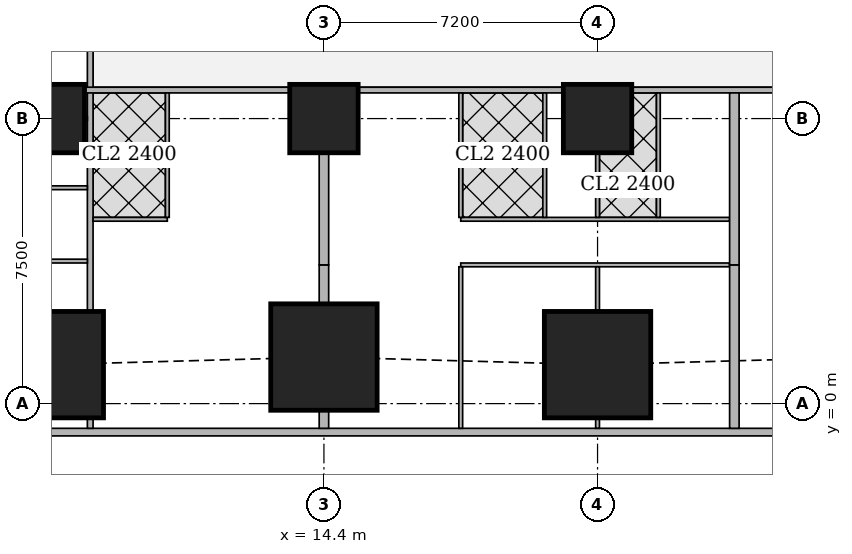
"""IFC4 building model, lengths in metres.
Left out: names, types, materials, properties, quantities, classifications, styles, units other than length and angle.
Written with IfcOpenShell. Run it as: python <this file> out.ifc"""

import sys

from ifc_helpers import new_model, si_unit, direction, frame, frame_2d, origin, origin_2d, place, context, subcontext, project, spatial, rectangle, extrude, element, fill, save


model = new_model("IFC4")
c1 = context("Model", 3, precision=1e-05, world=origin(), true_north=direction((0.0, 1.0)))
c2 = subcontext(c1, "Body", "Model", "MODEL_VIEW")
j1 = project(units=[si_unit("LENGTHUNIT", "METRE"), si_unit("PLANEANGLEUNIT", "RADIAN")], contexts=[c1])
p1 = place(None, origin())
s1 = spatial("IfcSite", under=j1, at=p1, CompositionType="ELEMENT")
p2 = place(p1, origin())
s2 = spatial("IfcBuilding", under=s1, at=p2, CompositionType="ELEMENT")
p3 = place(p2, frame((0.0, 0.0, 31.25)))
s3 = spatial("IfcBuildingStorey", under=s2, at=p3, CompositionType="ELEMENT", Elevation=31.25)
for number, where, z_axis, x_axis in (
    (1, (7.2, 1.025, 0.0), (0.0, 0.0, 1.0), (1.0, 0.0, 0.0)),
    (2, (14.4, 1.225, 0.0), (0.0, 0.0, 1.0), (1.0, 0.0, 0.0)),
    (3, (21.6, 1.025, 0.0), (0.0, 0.0, 1.0), (1.0, 0.0, 0.0)),
):
    element("IfcColumn", number, at=place(p3, frame(where, z_axis=z_axis, x_axis=x_axis)), inside=s3, PredefinedType="COLUMN", context=c2, shape_type="SweptSolid", body=[
        extrude(rectangle(XDim=2.8, YDim=2.8, at=origin_2d()), origin(), (0.0, 0.0, 1.0), 3.75),
    ])
for number, where, z_axis, x_axis in (
    (4, (7.2, 7.5, 0.0), (0.0, 0.0, 1.0), (1.0, 0.0, 0.0)),
    (5, (14.4, 7.5, 0.0), (0.0, 0.0, 1.0), (1.0, 0.0, 0.0)),
    (6, (21.6, 7.5, 0.0), (0.0, 0.0, 1.0), (1.0, 0.0, 0.0)),
):
    element("IfcColumn", number, at=place(p3, frame(where, z_axis=z_axis, x_axis=x_axis)), inside=s3, PredefinedType="COLUMN", context=c2, shape_type="SweptSolid", body=[
        extrude(rectangle(XDim=1.8, YDim=1.8, at=origin_2d()), origin(), (0.0, 0.0, 1.0), 3.75),
    ])
p4 = place(p3, frame((2.163, -0.75, 0.0), z_axis=(0.0, 0.0, 1.0), x_axis=(1.0, 0.0, 0.0)))
e7 = element("IfcWall", 7, at=p4, inside=s3, PredefinedType="SOLIDWALL", context=c2, shape_type="SweptSolid", body=[
    extrude(rectangle(XDim=45.628, YDim=0.2, at=frame_2d((22.814, 0.0))), origin(), (0.0, 0.0, 1.0), 3.5),
])
p5 = place(p4, frame((9.537, 0.0, 0.9)))
e8 = element("IfcOpeningElement", 8, at=p5, cuts=e7, PredefinedType="OPENING", context=c2, shape_type="SweptSolid", body=[
    extrude(rectangle(XDim=1.8, YDim=1.5, at=frame_2d((0.9, 0.75))), frame((0.0, 0.11, 0.0), z_axis=(0.0, -1.0, 0.0), x_axis=(1.0, 0.0, 0.0)), (0.0, 0.0, 1.0), 0.22),
])
p6 = place(p4, frame((13.137, 0.0, 0.9)))
e9 = element("IfcOpeningElement", 9, at=p6, cuts=e7, PredefinedType="OPENING", context=c2, shape_type="SweptSolid", body=[
    extrude(rectangle(XDim=1.8, YDim=1.5, at=frame_2d((0.9, 0.75))), frame((0.0, 0.11, 0.0), z_axis=(0.0, -1.0, 0.0), x_axis=(1.0, 0.0, 0.0)), (0.0, 0.0, 1.0), 0.22),
])
p7 = place(p4, frame((16.737, 0.0, 0.9)))
e10 = element("IfcOpeningElement", 10, at=p7, cuts=e7, PredefinedType="OPENING", context=c2, shape_type="SweptSolid", body=[
    extrude(rectangle(XDim=1.8, YDim=1.5, at=frame_2d((0.9, 0.75))), frame((0.0, 0.11, 0.0), z_axis=(0.0, -1.0, 0.0), x_axis=(1.0, 0.0, 0.0)), (0.0, 0.0, 1.0), 0.22),
])
p8 = place(p4, frame((20.337, 0.0, 0.9)))
e11 = element("IfcOpeningElement", 11, at=p8, cuts=e7, PredefinedType="OPENING", context=c2, shape_type="SweptSolid", body=[
    extrude(rectangle(XDim=1.8, YDim=1.5, at=frame_2d((0.9, 0.75))), frame((0.0, 0.11, 0.0), z_axis=(0.0, -1.0, 0.0), x_axis=(1.0, 0.0, 0.0)), (0.0, 0.0, 1.0), 0.22),
])
p9 = place(p4, frame((23.937, 0.0, 0.9)))
e12 = element("IfcOpeningElement", 12, at=p9, cuts=e7, PredefinedType="OPENING", context=c2, shape_type="SweptSolid", body=[
    extrude(rectangle(XDim=1.8, YDim=1.5, at=frame_2d((0.9, 0.75))), frame((0.0, 0.11, 0.0), z_axis=(0.0, -1.0, 0.0), x_axis=(1.0, 0.0, 0.0)), (0.0, 0.0, 1.0), 0.22),
])
p10 = place(p4, frame((27.537, 0.0, 0.9)))
e13 = element("IfcOpeningElement", 13, at=p10, cuts=e7, PredefinedType="OPENING", context=c2, shape_type="SweptSolid", body=[
    extrude(rectangle(XDim=1.8, YDim=1.5, at=frame_2d((0.9, 0.75))), frame((0.0, 0.11, 0.0), z_axis=(0.0, -1.0, 0.0), x_axis=(1.0, 0.0, 0.0)), (0.0, 0.0, 1.0), 0.22),
])
p11 = place(p4, frame((31.137, 0.0, 0.9)))
e14 = element("IfcOpeningElement", 14, at=p11, cuts=e7, PredefinedType="OPENING", context=c2, shape_type="SweptSolid", body=[
    extrude(rectangle(XDim=1.8, YDim=1.5, at=frame_2d((0.9, 0.75))), frame((0.0, 0.11, 0.0), z_axis=(0.0, -1.0, 0.0), x_axis=(1.0, 0.0, 0.0)), (0.0, 0.0, 1.0), 0.22),
])
p12 = place(p4, frame((34.737, 0.0, 0.9)))
e15 = element("IfcOpeningElement", 15, at=p12, cuts=e7, PredefinedType="OPENING", context=c2, shape_type="SweptSolid", body=[
    extrude(rectangle(XDim=1.8, YDim=1.5, at=frame_2d((0.9, 0.75))), frame((0.0, 0.11, 0.0), z_axis=(0.0, -1.0, 0.0), x_axis=(1.0, 0.0, 0.0)), (0.0, 0.0, 1.0), 0.22),
])
p13 = place(p3, frame((8.25, -0.65, 0.0), z_axis=(0.0, 0.0, 1.0), x_axis=(0.0, 1.0, 0.0)))
e16 = element("IfcWall", 16, at=p13, inside=s3, PredefinedType="SOLIDWALL", context=c2, shape_type="SweptSolid", body=[
    extrude(rectangle(XDim=0.274, YDim=0.15, at=frame_2d((0.137, 0.0))), origin(), (0.0, 0.0, 1.0), 3.5),
])
p14 = place(p3, frame((8.25, 2.426, 0.0), z_axis=(0.0, 0.0, 1.0), x_axis=(0.0, 1.0, 0.0)))
e17 = element("IfcWall", 17, at=p14, inside=s3, PredefinedType="SOLIDWALL", context=c2, shape_type="SweptSolid", body=[
    extrude(rectangle(XDim=40.173, YDim=0.15, at=frame_2d((20.086, 0.0))), origin(), (0.0, 0.0, 1.0), 3.5),
])
p15 = place(p14, frame((14.161, 0.0, 0.0)))
e18 = element("IfcOpeningElement", 18, at=p15, cuts=e17, PredefinedType="OPENING", context=c2, shape_type="SweptSolid", body=[
    extrude(rectangle(XDim=1.0, YDim=2.1, at=frame_2d((0.5, 1.05))), frame((0.0, 0.085, 0.0), z_axis=(0.0, -1.0, 0.0), x_axis=(1.0, 0.0, 0.0)), (0.0, 0.0, 1.0), 0.17),
])
p16 = place(p14, frame((17.487, 0.0, 0.0)))
e19 = element("IfcOpeningElement", 19, at=p16, cuts=e17, PredefinedType="OPENING", context=c2, shape_type="SweptSolid", body=[
    extrude(rectangle(XDim=1.0, YDim=2.1, at=frame_2d((0.5, 1.05))), frame((0.0, 0.085, 0.0), z_axis=(0.0, -1.0, 0.0), x_axis=(1.0, 0.0, 0.0)), (0.0, 0.0, 1.0), 0.17),
])
p17 = place(p14, frame((29.161, 0.0, 0.0)))
e20 = element("IfcOpeningElement", 20, at=p17, cuts=e17, PredefinedType="OPENING", context=c2, shape_type="SweptSolid", body=[
    extrude(rectangle(XDim=1.0, YDim=2.1, at=frame_2d((0.5, 1.05))), frame((0.0, 0.085, 0.0), z_axis=(0.0, -1.0, 0.0), x_axis=(1.0, 0.0, 0.0)), (0.0, 0.0, 1.0), 0.17),
])
p18 = place(p3, frame((27.899, 8.25, 0.0), z_axis=(0.0, 0.0, 1.0), x_axis=(-1.0, 0.0, 0.0)))
e21 = element("IfcWall", 21, at=p18, inside=s3, PredefinedType="SOLIDWALL", context=c2, shape_type="SweptSolid", body=[
    extrude(rectangle(XDim=5.398, YDim=0.15, at=frame_2d((2.699, 0.0))), origin(), (0.0, 0.0, 1.0), 3.5),
])
p19 = place(p18, frame((0.799, 0.0, 0.0)))
e22 = element("IfcOpeningElement", 22, at=p19, cuts=e21, PredefinedType="OPENING", context=c2, shape_type="SweptSolid", body=[
    extrude(rectangle(XDim=1.0, YDim=2.1, at=frame_2d((0.5, 1.05))), frame((0.0, 0.085, 0.0), z_axis=(0.0, -1.0, 0.0), x_axis=(1.0, 0.0, 0.0)), (0.0, 0.0, 1.0), 0.17),
])
p20 = place(p3, frame((20.699, 8.25, 0.0), z_axis=(0.0, 0.0, 1.0), x_axis=(-1.0, 0.0, 0.0)))
e23 = element("IfcWall", 23, at=p20, inside=s3, PredefinedType="SOLIDWALL", context=c2, shape_type="SweptSolid", body=[
    extrude(rectangle(XDim=5.398, YDim=0.15, at=frame_2d((2.699, 0.0))), origin(), (0.0, 0.0, 1.0), 3.5),
])
p21 = place(p20, frame((3.599, 0.0, 0.0)))
e24 = element("IfcOpeningElement", 24, at=p21, cuts=e23, PredefinedType="OPENING", context=c2, shape_type="SweptSolid", body=[
    extrude(rectangle(XDim=1.0, YDim=2.1, at=frame_2d((0.5, 1.05))), frame((0.0, 0.085, 0.0), z_axis=(0.0, -1.0, 0.0), x_axis=(1.0, 0.0, 0.0)), (0.0, 0.0, 1.0), 0.17),
])
p22 = place(p3, frame((13.499, 8.25, 0.0), z_axis=(0.0, 0.0, 1.0), x_axis=(-1.0, 0.0, 0.0)))
e25 = element("IfcWall", 25, at=p22, inside=s3, PredefinedType="SOLIDWALL", context=c2, shape_type="SweptSolid", body=[
    extrude(rectangle(XDim=5.399, YDim=0.15, at=frame_2d((2.699, 0.0))), origin(), (0.0, 0.0, 1.0), 3.5),
])
p23 = place(p22, frame((0.66, 0.0, 0.0)))
e26 = element("IfcOpeningElement", 26, at=p23, cuts=e25, PredefinedType="OPENING", context=c2, shape_type="SweptSolid", body=[
    extrude(rectangle(XDim=1.0, YDim=2.1, at=frame_2d((0.5, 1.05))), frame((0.0, 0.085, 0.0), z_axis=(0.0, -1.0, 0.0), x_axis=(1.0, 0.0, 0.0)), (0.0, 0.0, 1.0), 0.17),
])
p24 = place(p3, frame((4.9, 3.75, 0.0), z_axis=(0.0, 0.0, 1.0), x_axis=(1.0, 0.0, 0.0)))
e27 = element("IfcWall", 27, at=p24, inside=s3, PredefinedType="PARTITIONING", context=c2, shape_type="SweptSolid", body=[
    extrude(rectangle(XDim=3.275, YDim=0.1, at=frame_2d((1.638, 0.0))), origin(), (0.0, 0.0, 1.0), 3.5),
])
p25 = place(p3, frame((8.101, 7.5, 0.0), z_axis=(0.0, 0.0, 1.0), x_axis=(1.0, 0.0, 0.0)))
e28 = element("IfcWall", 28, at=p25, inside=s3, PredefinedType="PARTITIONING", context=c2, shape_type="SweptSolid", body=[
    extrude(rectangle(XDim=0.074, YDim=0.1, at=frame_2d((0.037, 0.0))), origin(), (0.0, 0.0, 1.0), 3.5),
])
p26 = place(p3, frame((4.9, 5.68, 0.0), z_axis=(0.0, 0.0, 1.0), x_axis=(1.0, 0.0, 0.0)))
e29 = element("IfcWall", 29, at=p26, inside=s3, PredefinedType="PARTITIONING", context=c2, shape_type="SweptSolid", body=[
    extrude(rectangle(XDim=3.275, YDim=0.1, at=frame_2d((1.638, 0.0))), origin(), (0.0, 0.0, 1.0), 3.5),
])
p27 = place(p3, frame((10.279, 4.85, 0.0), z_axis=(0.0, 0.0, 1.0), x_axis=(-1.0, 0.0, 0.0)))
e30 = element("IfcWall", 30, at=p27, inside=s3, PredefinedType="PARTITIONING", context=c2, shape_type="SweptSolid", body=[
    extrude(rectangle(XDim=1.954, YDim=0.1, at=frame_2d((0.977, 0.0))), origin(), (0.0, 0.0, 1.0), 3.5),
])
p28 = place(p27, frame((0.579, 0.0, 0.0)))
e31 = element("IfcOpeningElement", 31, at=p28, cuts=e30, PredefinedType="OPENING", context=c2, shape_type="SweptSolid", body=[
    extrude(rectangle(XDim=0.9, YDim=2.1, at=frame_2d((0.45, 1.05))), frame((0.0, 0.06, 0.0), z_axis=(0.0, -1.0, 0.0), x_axis=(1.0, 0.0, 0.0)), (0.0, 0.0, 1.0), 0.12),
])
p29 = place(p3, frame((10.279, 4.9, 0.0), z_axis=(0.0, 0.0, 1.0), x_axis=(0.0, 1.0, 0.0)))
e32 = element("IfcWall", 32, at=p29, inside=s3, PredefinedType="PARTITIONING", context=c2, shape_type="SweptSolid", body=[
    extrude(rectangle(XDim=3.275, YDim=0.1, at=frame_2d((1.638, 0.0))), origin(), (0.0, 0.0, 1.0), 3.5),
])
p30 = place(p3, frame((25.075, 3.65, 0.0), z_axis=(0.0, 0.0, 1.0), x_axis=(-1.0, 0.0, 0.0)))
e33 = element("IfcWall", 33, at=p30, inside=s3, PredefinedType="PARTITIONING", context=c2, shape_type="SweptSolid", body=[
    extrude(rectangle(XDim=7.075, YDim=0.1, at=frame_2d((3.538, 0.0))), origin(), (0.0, 0.0, 1.0), 3.5),
])
p31 = place(p30, frame((5.975, 0.0, 0.0)))
e34 = element("IfcOpeningElement", 34, at=p31, cuts=e33, PredefinedType="OPENING", context=c2, shape_type="SweptSolid", body=[
    extrude(rectangle(XDim=0.9, YDim=2.1, at=frame_2d((0.45, 1.05))), frame((0.0, 0.06, 0.0), z_axis=(0.0, -1.0, 0.0), x_axis=(1.0, 0.0, 0.0)), (0.0, 0.0, 1.0), 0.12),
])
p32 = place(p30, frame((1.15, 0.0, 0.0)))
e35 = element("IfcOpeningElement", 35, at=p32, cuts=e33, PredefinedType="OPENING", context=c2, shape_type="SweptSolid", body=[
    extrude(rectangle(XDim=0.9, YDim=2.1, at=frame_2d((0.45, 1.05))), frame((0.0, 0.06, 0.0), z_axis=(0.0, -1.0, 0.0), x_axis=(1.0, 0.0, 0.0)), (0.0, 0.0, 1.0), 0.12),
])
p33 = place(p3, frame((25.075, 4.85, 0.0), z_axis=(0.0, 0.0, 1.0), x_axis=(-1.0, 0.0, 0.0)))
e36 = element("IfcWall", 36, at=p33, inside=s3, PredefinedType="PARTITIONING", context=c2, shape_type="SweptSolid", body=[
    extrude(rectangle(XDim=7.075, YDim=0.1, at=frame_2d((3.538, 0.0))), origin(), (0.0, 0.0, 1.0), 3.5),
])
p34 = place(p33, frame((5.52, 0.0, 0.0)))
e37 = element("IfcOpeningElement", 37, at=p34, cuts=e36, PredefinedType="OPENING", context=c2, shape_type="SweptSolid", body=[
    extrude(rectangle(XDim=0.9, YDim=2.1, at=frame_2d((0.45, 1.05))), frame((0.0, 0.06, 0.0), z_axis=(0.0, -1.0, 0.0), x_axis=(1.0, 0.0, 0.0)), (0.0, 0.0, 1.0), 0.12),
])
p35 = place(p33, frame((2.225, 0.0, 0.0)))
e38 = element("IfcOpeningElement", 38, at=p35, cuts=e36, PredefinedType="OPENING", context=c2, shape_type="SweptSolid", body=[
    extrude(rectangle(XDim=0.9, YDim=2.1, at=frame_2d((0.45, 1.05))), frame((0.0, 0.06, 0.0), z_axis=(0.0, -1.0, 0.0), x_axis=(1.0, 0.0, 0.0)), (0.0, 0.0, 1.0), 0.12),
])
p36 = place(p33, frame((3.72, 0.0, 0.0)))
e39 = element("IfcOpeningElement", 39, at=p36, cuts=e36, PredefinedType="OPENING", context=c2, shape_type="SweptSolid", body=[
    extrude(rectangle(XDim=0.9, YDim=2.1, at=frame_2d((0.45, 1.05))), frame((0.0, 0.06, 0.0), z_axis=(0.0, -1.0, 0.0), x_axis=(1.0, 0.0, 0.0)), (0.0, 0.0, 1.0), 0.12),
])
p37 = place(p33, frame((0.425, 0.0, 0.0)))
e40 = element("IfcOpeningElement", 40, at=p37, cuts=e36, PredefinedType="OPENING", context=c2, shape_type="SweptSolid", body=[
    extrude(rectangle(XDim=0.9, YDim=2.1, at=frame_2d((0.45, 1.05))), frame((0.0, 0.06, 0.0), z_axis=(0.0, -1.0, 0.0), x_axis=(1.0, 0.0, 0.0)), (0.0, 0.0, 1.0), 0.12),
])
p38 = place(p3, frame((18.0, -0.65, 0.0), z_axis=(0.0, 0.0, 1.0), x_axis=(0.0, 1.0, 0.0)))
e41 = element("IfcWall", 41, at=p38, inside=s3, PredefinedType="PARTITIONING", context=c2, shape_type="SweptSolid", body=[
    extrude(rectangle(XDim=4.25, YDim=0.1, at=frame_2d((2.125, 0.0))), origin(), (0.0, 0.0, 1.0), 2.05),
])
p39 = place(p3, frame((21.6, -0.65, 0.0), z_axis=(0.0, 0.0, 1.0), x_axis=(0.0, 1.0, 0.0)))
e42 = element("IfcWall", 42, at=p39, inside=s3, PredefinedType="PARTITIONING", context=c2, shape_type="SweptSolid", body=[
    extrude(rectangle(XDim=0.274, YDim=0.1, at=frame_2d((0.137, 0.0))), origin(), (0.0, 0.0, 1.0), 3.5),
])
p40 = place(p3, frame((21.6, 2.426, 0.0), z_axis=(0.0, 0.0, 1.0), x_axis=(0.0, 1.0, 0.0)))
e43 = element("IfcWall", 43, at=p40, inside=s3, PredefinedType="PARTITIONING", context=c2, shape_type="SweptSolid", body=[
    extrude(rectangle(XDim=1.174, YDim=0.1, at=frame_2d((0.587, 0.0))), origin(), (0.0, 0.0, 1.0), 3.5),
])
p41 = place(p3, frame((18.0, 4.9, 0.0), z_axis=(0.0, 0.0, 1.0), x_axis=(0.0, 1.0, 0.0)))
e44 = element("IfcWall", 44, at=p41, inside=s3, PredefinedType="PARTITIONING", context=c2, shape_type="SweptSolid", body=[
    extrude(rectangle(XDim=3.275, YDim=0.1, at=frame_2d((1.638, 0.0))), origin(), (0.0, 0.0, 1.0), 3.5),
])
p42 = place(p3, frame((21.6, 4.9, 0.0), z_axis=(0.0, 0.0, 1.0), x_axis=(0.0, 1.0, 0.0)))
e45 = element("IfcWall", 45, at=p42, inside=s3, PredefinedType="PARTITIONING", context=c2, shape_type="SweptSolid", body=[
    extrude(rectangle(XDim=1.699, YDim=0.1, at=frame_2d((0.85, 0.0))), origin(), (0.0, 0.0, 1.0), 3.5),
])
for number, where, z_axis, x_axis in (
    (46, (20.21, 4.9, 0.0), (0.0, 0.0, 1.0), (0.0, 1.0, 0.0)),
    (47, (23.2, 4.9, 0.0), (0.0, 0.0, 1.0), (0.0, 1.0, 0.0)),
):
    element("IfcWall", number, at=place(p3, frame(where, z_axis=z_axis, x_axis=x_axis)), inside=s3, PredefinedType="PARTITIONING", context=c2, shape_type="SweptSolid", body=[
        extrude(rectangle(XDim=3.275, YDim=0.1, at=frame_2d((1.638, 0.0))), origin(), (0.0, 0.0, 1.0), 3.5),
    ])
p43 = place(p3, frame((14.4, -0.65, 0.0), z_axis=(0.0, 0.0, 1.0), x_axis=(0.0, 1.0, 0.0)))
e48 = element("IfcWall", 48, at=p43, inside=s3, PredefinedType="SOLIDWALL", context=c2, shape_type="SweptSolid", body=[
    extrude(rectangle(XDim=0.474, YDim=0.25, at=frame_2d((0.237, 0.0))), origin(), (0.0, 0.0, 1.0), 3.5),
])
p44 = place(p3, frame((14.4, 2.626, 0.0), z_axis=(0.0, 0.0, 1.0), x_axis=(0.0, 1.0, 0.0)))
e49 = element("IfcWall", 49, at=p44, inside=s3, PredefinedType="SOLIDWALL", context=c2, shape_type="SweptSolid", body=[
    extrude(rectangle(XDim=1.024, YDim=0.25, at=frame_2d((0.512, 0.0))), origin(), (0.0, 0.0, 1.0), 3.5),
])
p45 = place(p3, frame((14.4, 3.65, 0.0), z_axis=(0.0, 0.0, 1.0), x_axis=(0.0, 1.0, 0.0)))
e50 = element("IfcWall", 50, at=p45, inside=s3, PredefinedType="SOLIDWALL", context=c2, shape_type="SweptSolid", body=[
    extrude(rectangle(XDim=2.949, YDim=0.25, at=frame_2d((1.475, 0.0))), origin(), (0.0, 0.0, 1.0), 3.5),
])
p46 = place(p3, frame((25.2, -0.65, 0.0), z_axis=(0.0, 0.0, 1.0), x_axis=(0.0, 1.0, 0.0)))
e51 = element("IfcWall", 51, at=p46, inside=s3, PredefinedType="SOLIDWALL", context=c2, shape_type="SweptSolid", body=[
    extrude(rectangle(XDim=4.3, YDim=0.25, at=frame_2d((2.15, 0.0))), origin(), (0.0, 0.0, 1.0), 2.05),
])
p47 = place(p3, frame((25.2, 3.65, 0.0), z_axis=(0.0, 0.0, 1.0), x_axis=(0.0, 1.0, 0.0)))
e52 = element("IfcWall", 52, at=p47, inside=s3, PredefinedType="SOLIDWALL", context=c2, shape_type="SweptSolid", body=[
    extrude(rectangle(XDim=4.525, YDim=0.25, at=frame_2d((2.263, 0.0))), origin(), (0.0, 0.0, 1.0), 3.5),
])
p48 = place(p5, origin())
e53 = element("IfcWindow", 53, at=p48, inside=s3, PartitioningType="SINGLE_PANEL", PredefinedType="WINDOW", context=c2, shape_type="SweptSolid", body=[
    extrude(rectangle(XDim=1.8, YDim=1.5, at=frame_2d((0.9, 0.75))), frame((0.0, 0.03, 0.0), z_axis=(0.0, -1.0, 0.0), x_axis=(1.0, 0.0, 0.0)), (0.0, 0.0, 1.0), 0.06),
])
fill(e8, e53)
p49 = place(p6, origin())
e54 = element("IfcWindow", 54, at=p49, inside=s3, PartitioningType="SINGLE_PANEL", PredefinedType="WINDOW", context=c2, shape_type="SweptSolid", body=[
    extrude(rectangle(XDim=1.8, YDim=1.5, at=frame_2d((0.9, 0.75))), frame((0.0, 0.03, 0.0), z_axis=(0.0, -1.0, 0.0), x_axis=(1.0, 0.0, 0.0)), (0.0, 0.0, 1.0), 0.06),
])
fill(e9, e54)
p50 = place(p7, origin())
e55 = element("IfcWindow", 55, at=p50, inside=s3, PartitioningType="SINGLE_PANEL", PredefinedType="WINDOW", context=c2, shape_type="SweptSolid", body=[
    extrude(rectangle(XDim=1.8, YDim=1.5, at=frame_2d((0.9, 0.75))), frame((0.0, 0.03, 0.0), z_axis=(0.0, -1.0, 0.0), x_axis=(1.0, 0.0, 0.0)), (0.0, 0.0, 1.0), 0.06),
])
fill(e10, e55)
p51 = place(p8, origin())
e56 = element("IfcWindow", 56, at=p51, inside=s3, PartitioningType="SINGLE_PANEL", PredefinedType="WINDOW", context=c2, shape_type="SweptSolid", body=[
    extrude(rectangle(XDim=1.8, YDim=1.5, at=frame_2d((0.9, 0.75))), frame((0.0, 0.03, 0.0), z_axis=(0.0, -1.0, 0.0), x_axis=(1.0, 0.0, 0.0)), (0.0, 0.0, 1.0), 0.06),
])
fill(e11, e56)
p52 = place(p9, origin())
e57 = element("IfcWindow", 57, at=p52, inside=s3, PartitioningType="SINGLE_PANEL", PredefinedType="WINDOW", context=c2, shape_type="SweptSolid", body=[
    extrude(rectangle(XDim=1.8, YDim=1.5, at=frame_2d((0.9, 0.75))), frame((0.0, 0.03, 0.0), z_axis=(0.0, -1.0, 0.0), x_axis=(1.0, 0.0, 0.0)), (0.0, 0.0, 1.0), 0.06),
])
fill(e12, e57)
p53 = place(p28, origin())
e58 = element("IfcDoor", 58, at=p53, inside=s3, OperationType="SINGLE_SWING_LEFT", PredefinedType="DOOR", context=c2, shape_type="SweptSolid", body=[
    extrude(rectangle(XDim=0.9, YDim=2.1, at=frame_2d((0.45, 1.05))), frame((0.0, 0.025, 0.0), z_axis=(0.0, -1.0, 0.0), x_axis=(1.0, 0.0, 0.0)), (0.0, 0.0, 1.0), 0.05),
])
fill(e31, e58)
p54 = place(p23, origin())
e59 = element("IfcDoor", 59, at=p54, inside=s3, OperationType="SINGLE_SWING_LEFT", PredefinedType="DOOR", context=c2, shape_type="SweptSolid", body=[
    extrude(rectangle(XDim=1.0, YDim=2.1, at=frame_2d((0.5, 1.05))), frame((0.0, 0.025, 0.0), z_axis=(0.0, -1.0, 0.0), x_axis=(1.0, 0.0, 0.0)), (0.0, 0.0, 1.0), 0.05),
])
fill(e26, e59)
p55 = place(p31, origin())
e60 = element("IfcDoor", 60, at=p55, inside=s3, OperationType="SINGLE_SWING_RIGHT", PredefinedType="DOOR", context=c2, shape_type="SweptSolid", body=[
    extrude(rectangle(XDim=0.9, YDim=2.1, at=frame_2d((0.45, 1.05))), frame((0.0, 0.025, 0.0), z_axis=(0.0, -1.0, 0.0), x_axis=(1.0, 0.0, 0.0)), (0.0, 0.0, 1.0), 0.05),
])
fill(e34, e60)
p56 = place(p32, origin())
e61 = element("IfcDoor", 61, at=p56, inside=s3, OperationType="SINGLE_SWING_LEFT", PredefinedType="DOOR", context=c2, shape_type="SweptSolid", body=[
    extrude(rectangle(XDim=0.9, YDim=2.1, at=frame_2d((0.45, 1.05))), frame((0.0, 0.025, 0.0), z_axis=(0.0, -1.0, 0.0), x_axis=(1.0, 0.0, 0.0)), (0.0, 0.0, 1.0), 0.05),
])
fill(e35, e61)
p57 = place(p34, origin())
e62 = element("IfcDoor", 62, at=p57, inside=s3, OperationType="SINGLE_SWING_LEFT", PredefinedType="DOOR", context=c2, shape_type="SweptSolid", body=[
    extrude(rectangle(XDim=0.9, YDim=2.1, at=frame_2d((0.45, 1.05))), frame((0.0, 0.025, 0.0), z_axis=(0.0, -1.0, 0.0), x_axis=(1.0, 0.0, 0.0)), (0.0, 0.0, 1.0), 0.05),
])
fill(e37, e62)
p58 = place(p35, origin())
e63 = element("IfcDoor", 63, at=p58, inside=s3, OperationType="SINGLE_SWING_RIGHT", PredefinedType="DOOR", context=c2, shape_type="SweptSolid", body=[
    extrude(rectangle(XDim=0.9, YDim=2.1, at=frame_2d((0.45, 1.05))), frame((0.0, 0.025, 0.0), z_axis=(0.0, -1.0, 0.0), x_axis=(1.0, 0.0, 0.0)), (0.0, 0.0, 1.0), 0.05),
])
fill(e38, e63)
p59 = place(p36, origin())
e64 = element("IfcDoor", 64, at=p59, inside=s3, OperationType="SINGLE_SWING_RIGHT", PredefinedType="DOOR", context=c2, shape_type="SweptSolid", body=[
    extrude(rectangle(XDim=0.9, YDim=2.1, at=frame_2d((0.45, 1.05))), frame((0.0, 0.025, 0.0), z_axis=(0.0, -1.0, 0.0), x_axis=(1.0, 0.0, 0.0)), (0.0, 0.0, 1.0), 0.05),
])
fill(e39, e64)
p60 = place(p37, origin())
e65 = element("IfcDoor", 65, at=p60, inside=s3, OperationType="SINGLE_SWING_RIGHT", PredefinedType="DOOR", context=c2, shape_type="SweptSolid", body=[
    extrude(rectangle(XDim=0.9, YDim=2.1, at=frame_2d((0.45, 1.05))), frame((0.0, 0.025, 0.0), z_axis=(0.0, -1.0, 0.0), x_axis=(1.0, 0.0, 0.0)), (0.0, 0.0, 1.0), 0.05),
])
fill(e40, e65)
p61 = place(p21, origin())
e66 = element("IfcDoor", 66, at=p61, inside=s3, OperationType="SINGLE_SWING_RIGHT", PredefinedType="DOOR", context=c2, shape_type="SweptSolid", body=[
    extrude(rectangle(XDim=1.0, YDim=2.1, at=frame_2d((0.5, 1.05))), frame((0.0, 0.025, 0.0), z_axis=(0.0, -1.0, 0.0), x_axis=(1.0, 0.0, 0.0)), (0.0, 0.0, 1.0), 0.05),
])
fill(e24, e66)
p62 = place(p19, origin())
e67 = element("IfcDoor", 67, at=p62, inside=s3, OperationType="SINGLE_SWING_LEFT", PredefinedType="DOOR", context=c2, shape_type="SweptSolid", body=[
    extrude(rectangle(XDim=1.0, YDim=2.1, at=frame_2d((0.5, 1.05))), frame((0.0, 0.025, 0.0), z_axis=(0.0, -1.0, 0.0), x_axis=(1.0, 0.0, 0.0)), (0.0, 0.0, 1.0), 0.05),
])
fill(e22, e67)
save(model, sys.argv[1])
